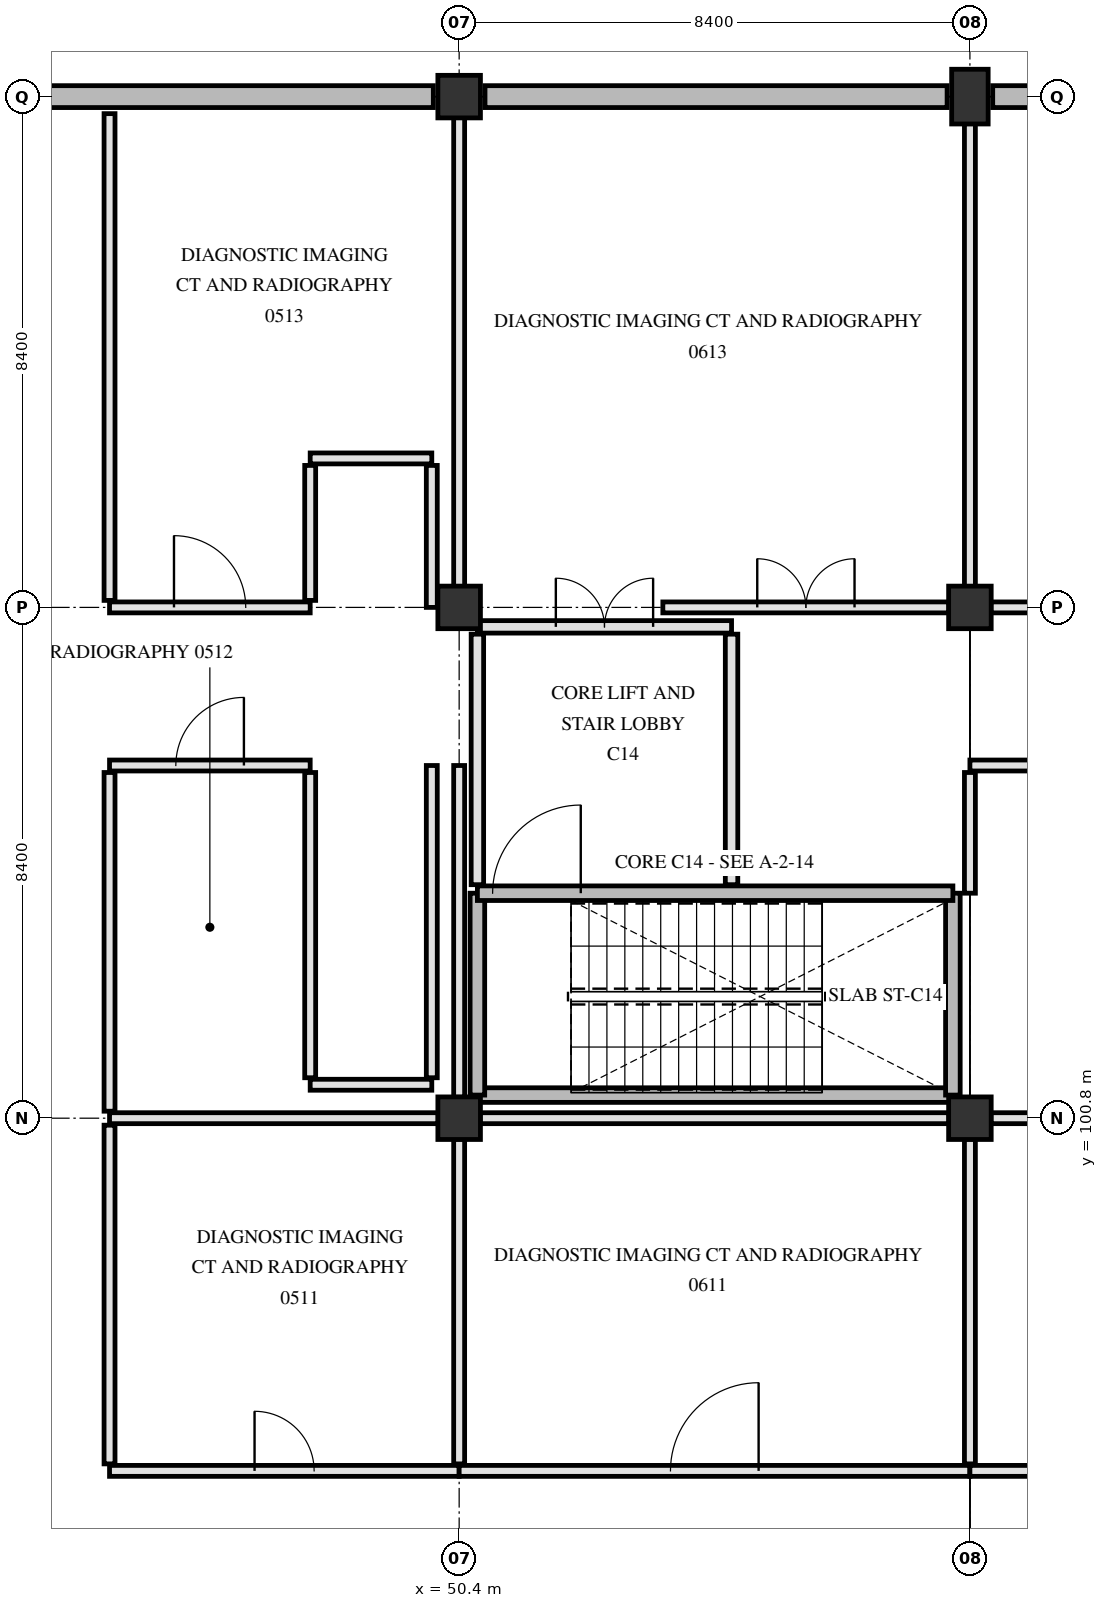
"""IFC4 building model, lengths in metres.
Left out: names, types, materials, properties, quantities, classifications, styles, units other than length and angle.
Written with IfcOpenShell. Run it as: python <this file> out.ifc"""

import sys

from ifc_helpers import new_model, si_unit, direction, frame, frame_2d, origin, origin_2d, place, context, subcontext, project, spatial, rectangle, extrude, element, fill, save


model = new_model("IFC4")
c1 = context("Model", 3, precision=1e-05, world=origin(), true_north=direction((0.0, 1.0)))
c2 = subcontext(c1, "Body", "Model", "MODEL_VIEW")
j1 = project(units=[si_unit("LENGTHUNIT", "METRE"), si_unit("PLANEANGLEUNIT", "RADIAN")], contexts=[c1])
p1 = place(None, origin())
s1 = spatial("IfcSite", under=j1, at=p1, CompositionType="ELEMENT")
p2 = place(p1, origin())
s2 = spatial("IfcBuilding", under=s1, at=p2, CompositionType="ELEMENT")
p3 = place(p2, origin())
s3 = spatial("IfcBuildingStorey", under=s2, at=p3, CompositionType="ELEMENT", Elevation=0.0)
for number, where, z_axis, x_axis in (
    (1, (50.4, 100.8, 0.0), (0.0, 0.0, 1.0), (1.0, 0.0, 0.0)),
    (2, (50.4, 109.2, 0.0), (0.0, 0.0, 1.0), (1.0, 0.0, 0.0)),
    (3, (50.4, 117.6, 0.0), (0.0, 0.0, 1.0), (1.0, 0.0, 0.0)),
    (4, (58.8, 100.8, 0.0), (0.0, 0.0, 1.0), (1.0, 0.0, 0.0)),
    (5, (58.8, 109.2, 0.0), (0.0, 0.0, 1.0), (1.0, 0.0, 0.0)),
):
    element("IfcColumn", number, at=place(p3, frame(where, z_axis=z_axis, x_axis=x_axis)), inside=s3, PredefinedType="COLUMN", context=c2, shape_type="SweptSolid", body=[
        extrude(rectangle(XDim=0.7, YDim=0.7, at=origin_2d()), origin(), (0.0, 0.0, 1.0), 4.8),
    ])
p4 = place(p3, frame((58.8, 117.6, 0.0), z_axis=(0.0, 0.0, 1.0), x_axis=(1.0, 0.0, 0.0)))
e6 = element("IfcColumn", 6, at=p4, inside=s3, PredefinedType="PILASTER", context=c2, shape_type="SweptSolid", body=[
    extrude(rectangle(XDim=0.6, YDim=0.9, at=origin_2d()), origin(), (0.0, 0.0, 1.0), 4.8),
])
p5 = place(p3, frame((42.425, 117.6, 0.0), z_axis=(0.0, 0.0, 1.0), x_axis=(1.0, 0.0, 0.0)))
e7 = element("IfcWall", 7, at=p5, inside=s3, PredefinedType="SOLIDWALL", context=c2, shape_type="SweptSolid", body=[
    extrude(rectangle(XDim=7.55, YDim=0.36, at=frame_2d((3.775, 0.0))), origin(), (0.0, 0.0, 1.0), 4.5),
])
p6 = place(p3, frame((50.825, 117.6, 0.0), z_axis=(0.0, 0.0, 1.0), x_axis=(1.0, 0.0, 0.0)))
e8 = element("IfcWall", 8, at=p6, inside=s3, PredefinedType="SOLIDWALL", context=c2, shape_type="SweptSolid", body=[
    extrude(rectangle(XDim=7.6, YDim=0.36, at=frame_2d((3.8, 0.0))), origin(), (0.0, 0.0, 1.0), 4.5),
])
p7 = place(p3, frame((59.175, 117.6, 0.0), z_axis=(0.0, 0.0, 1.0), x_axis=(1.0, 0.0, 0.0)))
e9 = element("IfcWall", 9, at=p7, inside=s3, PredefinedType="SOLIDWALL", context=c2, shape_type="SweptSolid", body=[
    extrude(rectangle(XDim=7.5, YDim=0.36, at=frame_2d((3.75, 0.0))), origin(), (0.0, 0.0, 1.0), 4.5),
])
p8 = place(p3, frame((50.7, 101.18, 0.0), z_axis=(0.0, 0.0, 1.0), x_axis=(1.0, 0.0, 0.0)))
e10 = element("IfcWall", 10, at=p8, inside=s3, PredefinedType="SHEAR", context=c2, shape_type="SweptSolid", body=[
    extrude(rectangle(XDim=7.82, YDim=0.24, at=frame_2d((3.91, 0.0))), origin(), (0.0, 0.0, 1.0), 4.5),
])
for number, where, z_axis, x_axis in (
    (11, (50.7, 101.18, 0.0), (0.0, 0.0, 1.0), (0.0, 1.0, 0.0)),
    (12, (58.52, 101.18, 0.0), (0.0, 0.0, 1.0), (0.0, 1.0, 0.0)),
):
    element("IfcWall", number, at=place(p3, frame(where, z_axis=z_axis, x_axis=x_axis)), inside=s3, PredefinedType="SHEAR", context=c2, shape_type="SweptSolid", body=[
        extrude(rectangle(XDim=3.32, YDim=0.24, at=frame_2d((1.66, 0.0))), origin(), (0.0, 0.0, 1.0), 4.5),
    ])
p9 = place(p3, frame((50.7, 104.5, 0.0), z_axis=(0.0, 0.0, 1.0), x_axis=(1.0, 0.0, 0.0)))
e13 = element("IfcWall", 13, at=p9, inside=s3, PredefinedType="SHEAR", context=c2, shape_type="SweptSolid", body=[
    extrude(rectangle(XDim=7.82, YDim=0.24, at=frame_2d((3.91, 0.0))), origin(), (0.0, 0.0, 1.0), 4.5),
])
p10 = place(p9, frame((0.25, 0.0, 0.0)))
e14 = element("IfcOpeningElement", 14, at=p10, cuts=e13, PredefinedType="OPENING", context=c2, shape_type="SweptSolid", body=[
    extrude(rectangle(XDim=1.45, YDim=2.2, at=frame_2d((0.725, 1.1))), frame((0.0, 0.13, 0.0), z_axis=(0.0, -1.0, 0.0), x_axis=(1.0, 0.0, 0.0)), (0.0, 0.0, 1.0), 0.26),
])
p11 = place(p3, frame((54.88, 104.64, 0.0), z_axis=(0.0, 0.0, 1.0), x_axis=(0.0, 1.0, 0.0)))
e15 = element("IfcWall", 15, at=p11, inside=s3, PredefinedType="PARTITIONING", context=c2, shape_type="SweptSolid", body=[
    extrude(rectangle(XDim=4.12, YDim=0.205, at=frame_2d((2.06, 0.0))), origin(), (0.0, 0.0, 1.0), 4.49),
])
p12 = place(p3, frame((50.7, 104.64, 0.0), z_axis=(0.0, 0.0, 1.0), x_axis=(0.0, 1.0, 0.0)))
e16 = element("IfcWall", 16, at=p12, inside=s3, PredefinedType="PARTITIONING", context=c2, shape_type="SweptSolid", body=[
    extrude(rectangle(XDim=4.12, YDim=0.205, at=frame_2d((2.06, 0.0))), origin(), (0.0, 0.0, 1.0), 3.89),
])
p13 = place(p3, frame((50.7, 108.88, 0.0), z_axis=(0.0, 0.0, 1.0), x_axis=(1.0, 0.0, 0.0)))
e17 = element("IfcWall", 17, at=p13, inside=s3, PredefinedType="PARTITIONING", context=c2, shape_type="SweptSolid", body=[
    extrude(rectangle(XDim=4.18, YDim=0.205, at=frame_2d((2.09, 0.0))), origin(), (0.0, 0.0, 1.0), 3.84),
])
p14 = place(p13, frame((1.29, 0.0, 0.0)))
e18 = element("IfcOpeningElement", 18, at=p14, cuts=e17, PredefinedType="OPENING", context=c2, shape_type="SweptSolid", body=[
    extrude(rectangle(XDim=1.6, YDim=2.25, at=frame_2d((0.8, 1.125))), frame((0.0, 0.113, 0.0), z_axis=(0.0, -1.0, 0.0), x_axis=(1.0, 0.0, 0.0)), (0.0, 0.0, 1.0), 0.225),
])
p15 = place(p3, frame((44.65, 95.0, 0.0), z_axis=(0.0, 0.0, 1.0), x_axis=(1.0, 0.0, 0.0)))
e19 = element("IfcWall", 19, at=p15, inside=s3, PredefinedType="PARTITIONING", context=c2, shape_type="SweptSolid", body=[
    extrude(rectangle(XDim=5.75, YDim=0.18, at=frame_2d((2.875, 0.0))), origin(), (0.0, 0.0, 1.0), 3.89),
])
p16 = place(p15, frame((2.385, 0.0, 0.0)))
e20 = element("IfcOpeningElement", 20, at=p16, cuts=e19, PredefinedType="OPENING", context=c2, shape_type="SweptSolid", body=[
    extrude(rectangle(XDim=0.98, YDim=2.12, at=frame_2d((0.49, 1.06))), frame((0.0, 0.1, 0.0), z_axis=(0.0, -1.0, 0.0), x_axis=(1.0, 0.0, 0.0)), (0.0, 0.0, 1.0), 0.2),
])
p17 = place(p3, frame((50.4, 95.0, 0.0), z_axis=(0.0, 0.0, 1.0), x_axis=(1.0, 0.0, 0.0)))
e21 = element("IfcWall", 21, at=p17, inside=s3, PredefinedType="PARTITIONING", context=c2, shape_type="SweptSolid", body=[
    extrude(rectangle(XDim=8.4, YDim=0.18, at=frame_2d((4.2, 0.0))), origin(), (0.0, 0.0, 1.0), 3.89),
])
p18 = place(p17, frame((3.475, 0.0, 0.0)))
e22 = element("IfcOpeningElement", 22, at=p18, cuts=e21, PredefinedType="OPENING", context=c2, shape_type="SweptSolid", body=[
    extrude(rectangle(XDim=1.45, YDim=2.2, at=frame_2d((0.725, 1.1))), frame((0.0, 0.1, 0.0), z_axis=(0.0, -1.0, 0.0), x_axis=(1.0, 0.0, 0.0)), (0.0, 0.0, 1.0), 0.2),
])
p19 = place(p3, frame((58.8, 95.0, 0.0), z_axis=(0.0, 0.0, 1.0), x_axis=(1.0, 0.0, 0.0)))
e23 = element("IfcWall", 23, at=p19, inside=s3, PredefinedType="PARTITIONING", context=c2, shape_type="SweptSolid", body=[
    extrude(rectangle(XDim=8.4, YDim=0.18, at=frame_2d((4.2, 0.0))), origin(), (0.0, 0.0, 1.0), 3.89),
])
p20 = place(p19, frame((3.65, 0.0, 0.0)))
e24 = element("IfcOpeningElement", 24, at=p20, cuts=e23, PredefinedType="OPENING", context=c2, shape_type="SweptSolid", body=[
    extrude(rectangle(XDim=1.1, YDim=2.15, at=frame_2d((0.55, 1.075))), frame((0.0, 0.1, 0.0), z_axis=(0.0, -1.0, 0.0), x_axis=(1.0, 0.0, 0.0)), (0.0, 0.0, 1.0), 0.2),
])
p21 = place(p3, frame((44.65, 100.8, 0.0), z_axis=(0.0, 0.0, 1.0), x_axis=(1.0, 0.0, 0.0)))
e25 = element("IfcWall", 25, at=p21, inside=s3, PredefinedType="PARTITIONING", context=c2, shape_type="SweptSolid", body=[
    extrude(rectangle(XDim=5.405, YDim=0.18, at=frame_2d((2.703, 0.0))), origin(), (0.0, 0.0, 1.0), 3.84),
])
p22 = place(p3, frame((50.745, 100.8, 0.0), z_axis=(0.0, 0.0, 1.0), x_axis=(1.0, 0.0, 0.0)))
e26 = element("IfcWall", 26, at=p22, inside=s3, PredefinedType="PARTITIONING", context=c2, shape_type="SweptSolid", body=[
    extrude(rectangle(XDim=7.71, YDim=0.18, at=frame_2d((3.855, 0.0))), origin(), (0.0, 0.0, 1.0), 3.84),
])
p23 = place(p3, frame((59.145, 100.8, 0.0), z_axis=(0.0, 0.0, 1.0), x_axis=(1.0, 0.0, 0.0)))
e27 = element("IfcWall", 27, at=p23, inside=s3, PredefinedType="PARTITIONING", context=c2, shape_type="SweptSolid", body=[
    extrude(rectangle(XDim=7.61, YDim=0.18, at=frame_2d((3.805, 0.0))), origin(), (0.0, 0.0, 1.0), 3.84),
])
p24 = place(p3, frame((47.95, 101.35, 0.0), z_axis=(0.0, 0.0, 1.0), x_axis=(1.0, 0.0, 0.0)))
e28 = element("IfcWall", 28, at=p24, inside=s3, PredefinedType="PARTITIONING", context=c2, shape_type="SweptSolid", body=[
    extrude(rectangle(XDim=2.0, YDim=0.18, at=frame_2d((1.0, 0.0))), origin(), (0.0, 0.0, 1.0), 4.49),
])
p25 = place(p3, frame((44.65, 106.6, 0.0), z_axis=(0.0, 0.0, 1.0), x_axis=(1.0, 0.0, 0.0)))
e29 = element("IfcWall", 29, at=p25, inside=s3, PredefinedType="PARTITIONING", context=c2, shape_type="SweptSolid", body=[
    extrude(rectangle(XDim=3.3, YDim=0.18, at=frame_2d((1.65, 0.0))), origin(), (0.0, 0.0, 1.0), 4.49),
])
p26 = place(p25, frame((1.09, 0.0, 0.0)))
e30 = element("IfcOpeningElement", 30, at=p26, cuts=e29, PredefinedType="OPENING", context=c2, shape_type="SweptSolid", body=[
    extrude(rectangle(XDim=1.12, YDim=2.18, at=frame_2d((0.56, 1.09))), frame((0.0, 0.1, 0.0), z_axis=(0.0, -1.0, 0.0), x_axis=(1.0, 0.0, 0.0)), (0.0, 0.0, 1.0), 0.2),
])
p27 = place(p3, frame((58.8, 106.6, 0.0), z_axis=(0.0, 0.0, 1.0), x_axis=(1.0, 0.0, 0.0)))
e31 = element("IfcWall", 31, at=p27, inside=s3, PredefinedType="PARTITIONING", context=c2, shape_type="SweptSolid", body=[
    extrude(rectangle(XDim=8.4, YDim=0.18, at=frame_2d((4.2, 0.0))), origin(), (0.0, 0.0, 1.0), 3.89),
])
p28 = place(p27, frame((3.625, 0.0, 0.0)))
e32 = element("IfcOpeningElement", 32, at=p28, cuts=e31, PredefinedType="OPENING", context=c2, shape_type="SweptSolid", body=[
    extrude(rectangle(XDim=1.15, YDim=2.15, at=frame_2d((0.575, 1.075))), frame((0.0, 0.1, 0.0), z_axis=(0.0, -1.0, 0.0), x_axis=(1.0, 0.0, 0.0)), (0.0, 0.0, 1.0), 0.2),
])
p29 = place(p3, frame((44.65, 109.2, 0.0), z_axis=(0.0, 0.0, 1.0), x_axis=(1.0, 0.0, 0.0)))
e33 = element("IfcWall", 33, at=p29, inside=s3, PredefinedType="PARTITIONING", context=c2, shape_type="SweptSolid", body=[
    extrude(rectangle(XDim=3.3, YDim=0.18, at=frame_2d((1.65, 0.0))), origin(), (0.0, 0.0, 1.0), 3.84),
])
p30 = place(p29, frame((1.06, 0.0, 0.0)))
e34 = element("IfcOpeningElement", 34, at=p30, cuts=e33, PredefinedType="OPENING", context=c2, shape_type="SweptSolid", body=[
    extrude(rectangle(XDim=1.18, YDim=2.18, at=frame_2d((0.59, 1.09))), frame((0.0, 0.1, 0.0), z_axis=(0.0, -1.0, 0.0), x_axis=(1.0, 0.0, 0.0)), (0.0, 0.0, 1.0), 0.2),
])
p31 = place(p3, frame((53.75, 109.2, 0.0), z_axis=(0.0, 0.0, 1.0), x_axis=(1.0, 0.0, 0.0)))
e35 = element("IfcWall", 35, at=p31, inside=s3, PredefinedType="PARTITIONING", context=c2, shape_type="SweptSolid", body=[
    extrude(rectangle(XDim=4.705, YDim=0.18, at=frame_2d((2.353, 0.0))), origin(), (0.0, 0.0, 1.0), 3.84),
])
p32 = place(p31, frame((1.552, 0.0, 0.0)))
e36 = element("IfcOpeningElement", 36, at=p32, cuts=e35, PredefinedType="OPENING", context=c2, shape_type="SweptSolid", body=[
    extrude(rectangle(XDim=1.6, YDim=2.25, at=frame_2d((0.8, 1.125))), frame((0.0, 0.1, 0.0), z_axis=(0.0, -1.0, 0.0), x_axis=(1.0, 0.0, 0.0)), (0.0, 0.0, 1.0), 0.2),
])
p33 = place(p3, frame((59.145, 109.2, 0.0), z_axis=(0.0, 0.0, 1.0), x_axis=(1.0, 0.0, 0.0)))
e37 = element("IfcWall", 37, at=p33, inside=s3, PredefinedType="PARTITIONING", context=c2, shape_type="SweptSolid", body=[
    extrude(rectangle(XDim=7.61, YDim=0.18, at=frame_2d((3.805, 0.0))), origin(), (0.0, 0.0, 1.0), 3.84),
])
p34 = place(p33, frame((3.205, 0.0, 0.0)))
e38 = element("IfcOpeningElement", 38, at=p34, cuts=e37, PredefinedType="OPENING", context=c2, shape_type="SweptSolid", body=[
    extrude(rectangle(XDim=1.2, YDim=2.15, at=frame_2d((0.6, 1.075))), frame((0.0, 0.1, 0.0), z_axis=(0.0, -1.0, 0.0), x_axis=(1.0, 0.0, 0.0)), (0.0, 0.0, 1.0), 0.2),
])
p35 = place(p3, frame((47.95, 111.65, 0.0), z_axis=(0.0, 0.0, 1.0), x_axis=(1.0, 0.0, 0.0)))
e39 = element("IfcWall", 39, at=p35, inside=s3, PredefinedType="PARTITIONING", context=c2, shape_type="SweptSolid", body=[
    extrude(rectangle(XDim=2.0, YDim=0.18, at=frame_2d((1.0, 0.0))), origin(), (0.0, 0.0, 1.0), 4.49),
])
for number, where, z_axis, x_axis in (
    (40, (44.65, 95.115, 0.0), (0.0, 0.0, 1.0), (0.0, 1.0, 0.0)),
    (41, (44.65, 100.915, 0.0), (0.0, 0.0, 1.0), (0.0, 1.0, 0.0)),
):
    element("IfcWall", number, at=place(p3, frame(where, z_axis=z_axis, x_axis=x_axis)), inside=s3, PredefinedType="PARTITIONING", context=c2, shape_type="SweptSolid", body=[
        extrude(rectangle(XDim=5.57, YDim=0.18, at=frame_2d((2.785, 0.0))), origin(), (0.0, 0.0, 1.0), 3.84),
    ])
p36 = place(p3, frame((44.65, 109.315, 0.0), z_axis=(0.0, 0.0, 1.0), x_axis=(0.0, 1.0, 0.0)))
e42 = element("IfcWall", 42, at=p36, inside=s3, PredefinedType="PARTITIONING", context=c2, shape_type="SweptSolid", body=[
    extrude(rectangle(XDim=8.005, YDim=0.18, at=frame_2d((4.002, 0.0))), origin(), (0.0, 0.0, 1.0), 3.84),
])
p37 = place(p3, frame((47.95, 101.465, 0.0), z_axis=(0.0, 0.0, 1.0), x_axis=(0.0, 1.0, 0.0)))
e43 = element("IfcWall", 43, at=p37, inside=s3, PredefinedType="PARTITIONING", context=c2, shape_type="SweptSolid", body=[
    extrude(rectangle(XDim=5.02, YDim=0.18, at=frame_2d((2.51, 0.0))), origin(), (0.0, 0.0, 1.0), 4.49),
])
p38 = place(p3, frame((47.95, 109.315, 0.0), z_axis=(0.0, 0.0, 1.0), x_axis=(0.0, 1.0, 0.0)))
e44 = element("IfcWall", 44, at=p38, inside=s3, PredefinedType="PARTITIONING", context=c2, shape_type="SweptSolid", body=[
    extrude(rectangle(XDim=2.22, YDim=0.18, at=frame_2d((1.11, 0.0))), origin(), (0.0, 0.0, 1.0), 3.84),
])
p39 = place(p3, frame((49.95, 101.465, 0.0), z_axis=(0.0, 0.0, 1.0), x_axis=(0.0, 1.0, 0.0)))
e45 = element("IfcWall", 45, at=p39, inside=s3, PredefinedType="PARTITIONING", context=c2, shape_type="SweptSolid", body=[
    extrude(rectangle(XDim=5.135, YDim=0.18, at=frame_2d((2.567, 0.0))), origin(), (0.0, 0.0, 1.0), 4.49),
])
p40 = place(p3, frame((49.95, 109.2, 0.0), z_axis=(0.0, 0.0, 1.0), x_axis=(0.0, 1.0, 0.0)))
e46 = element("IfcWall", 46, at=p40, inside=s3, PredefinedType="PARTITIONING", context=c2, shape_type="SweptSolid", body=[
    extrude(rectangle(XDim=2.335, YDim=0.18, at=frame_2d((1.167, 0.0))), origin(), (0.0, 0.0, 1.0), 3.84),
])
p41 = place(p3, frame((50.4, 95.115, 0.0), z_axis=(0.0, 0.0, 1.0), x_axis=(0.0, 1.0, 0.0)))
e47 = element("IfcWall", 47, at=p41, inside=s3, PredefinedType="PARTITIONING", context=c2, shape_type="SweptSolid", body=[
    extrude(rectangle(XDim=5.34, YDim=0.18, at=frame_2d((2.67, 0.0))), origin(), (0.0, 0.0, 1.0), 3.89),
])
p42 = place(p3, frame((50.4, 101.145, 0.0), z_axis=(0.0, 0.0, 1.0), x_axis=(0.0, 1.0, 0.0)))
e48 = element("IfcWall", 48, at=p42, inside=s3, PredefinedType="PARTITIONING", context=c2, shape_type="SweptSolid", body=[
    extrude(rectangle(XDim=5.455, YDim=0.18, at=frame_2d((2.728, 0.0))), origin(), (0.0, 0.0, 1.0), 3.89),
])
p43 = place(p3, frame((50.4, 109.545, 0.0), z_axis=(0.0, 0.0, 1.0), x_axis=(0.0, 1.0, 0.0)))
e49 = element("IfcWall", 49, at=p43, inside=s3, PredefinedType="PARTITIONING", context=c2, shape_type="SweptSolid", body=[
    extrude(rectangle(XDim=7.71, YDim=0.18, at=frame_2d((3.855, 0.0))), origin(), (0.0, 0.0, 1.0), 3.89),
])
p44 = place(p3, frame((58.8, 95.115, 0.0), z_axis=(0.0, 0.0, 1.0), x_axis=(0.0, 1.0, 0.0)))
e50 = element("IfcWall", 50, at=p44, inside=s3, PredefinedType="PARTITIONING", context=c2, shape_type="SweptSolid", body=[
    extrude(rectangle(XDim=5.34, YDim=0.18, at=frame_2d((2.67, 0.0))), origin(), (0.0, 0.0, 1.0), 3.89),
])
p45 = place(p3, frame((58.8, 104.5, 0.0), z_axis=(0.0, 0.0, 1.0), x_axis=(0.0, 1.0, 0.0)))
e51 = element("IfcWall", 51, at=p45, inside=s3, PredefinedType="PARTITIONING", context=c2, shape_type="SweptSolid", body=[
    extrude(rectangle(XDim=1.985, YDim=0.18, at=frame_2d((0.993, 0.0))), origin(), (0.0, 0.0, 1.0), 3.89),
])
p46 = place(p3, frame((58.8, 109.545, 0.0), z_axis=(0.0, 0.0, 1.0), x_axis=(0.0, 1.0, 0.0)))
e52 = element("IfcWall", 52, at=p46, inside=s3, PredefinedType="PARTITIONING", context=c2, shape_type="SweptSolid", body=[
    extrude(rectangle(XDim=7.61, YDim=0.18, at=frame_2d((3.805, 0.0))), origin(), (0.0, 0.0, 1.0), 3.89),
])
p47 = place(p10, origin())
e53 = element("IfcDoor", 53, at=p47, inside=s3, OperationType="SINGLE_SWING_RIGHT", PredefinedType="DOOR", context=c2, shape_type="SweptSolid", body=[
    extrude(rectangle(XDim=1.45, YDim=2.2, at=frame_2d((0.725, 1.1))), frame((0.0, 0.025, 0.0), z_axis=(0.0, -1.0, 0.0), x_axis=(1.0, 0.0, 0.0)), (0.0, 0.0, 1.0), 0.05),
])
fill(e14, e53)
p48 = place(p14, origin())
e54 = element("IfcDoor", 54, at=p48, inside=s3, OperationType="DOUBLE_SWING_LEFT", PredefinedType="DOOR", context=c2, shape_type="SweptSolid", body=[
    extrude(rectangle(XDim=1.6, YDim=2.25, at=frame_2d((0.8, 1.125))), frame((0.0, 0.025, 0.0), z_axis=(0.0, -1.0, 0.0), x_axis=(1.0, 0.0, 0.0)), (0.0, 0.0, 1.0), 0.05),
])
fill(e18, e54)
p49 = place(p16, origin())
e55 = element("IfcDoor", 55, at=p49, inside=s3, OperationType="SINGLE_SWING_LEFT", PredefinedType="DOOR", context=c2, shape_type="SweptSolid", body=[
    extrude(rectangle(XDim=0.98, YDim=2.12, at=frame_2d((0.49, 1.06))), frame((0.0, 0.025, 0.0), z_axis=(0.0, -1.0, 0.0), x_axis=(1.0, 0.0, 0.0)), (0.0, 0.0, 1.0), 0.05),
])
fill(e20, e55)
p50 = place(p26, origin())
e56 = element("IfcDoor", 56, at=p50, inside=s3, OperationType="SINGLE_SWING_RIGHT", PredefinedType="DOOR", context=c2, shape_type="SweptSolid", body=[
    extrude(rectangle(XDim=1.12, YDim=2.18, at=frame_2d((0.56, 1.09))), frame((0.0, 0.025, 0.0), z_axis=(0.0, -1.0, 0.0), x_axis=(1.0, 0.0, 0.0)), (0.0, 0.0, 1.0), 0.05),
])
fill(e30, e56)
p51 = place(p30, origin())
e57 = element("IfcDoor", 57, at=p51, inside=s3, OperationType="SINGLE_SWING_LEFT", PredefinedType="DOOR", context=c2, shape_type="SweptSolid", body=[
    extrude(rectangle(XDim=1.18, YDim=2.18, at=frame_2d((0.59, 1.09))), frame((0.0, 0.025, 0.0), z_axis=(0.0, -1.0, 0.0), x_axis=(1.0, 0.0, 0.0)), (0.0, 0.0, 1.0), 0.05),
])
fill(e34, e57)
p52 = place(p18, origin())
e58 = element("IfcDoor", 58, at=p52, inside=s3, OperationType="SINGLE_SWING_RIGHT", PredefinedType="DOOR", context=c2, shape_type="SweptSolid", body=[
    extrude(rectangle(XDim=1.45, YDim=2.2, at=frame_2d((0.725, 1.1))), frame((0.0, 0.025, 0.0), z_axis=(0.0, -1.0, 0.0), x_axis=(1.0, 0.0, 0.0)), (0.0, 0.0, 1.0), 0.05),
])
fill(e22, e58)
p53 = place(p32, origin())
e59 = element("IfcDoor", 59, at=p53, inside=s3, OperationType="DOUBLE_SWING_LEFT", PredefinedType="DOOR", context=c2, shape_type="SweptSolid", body=[
    extrude(rectangle(XDim=1.6, YDim=2.25, at=frame_2d((0.8, 1.125))), frame((0.0, 0.025, 0.0), z_axis=(0.0, -1.0, 0.0), x_axis=(1.0, 0.0, 0.0)), (0.0, 0.0, 1.0), 0.05),
])
fill(e36, e59)
save(model, sys.argv[1])
